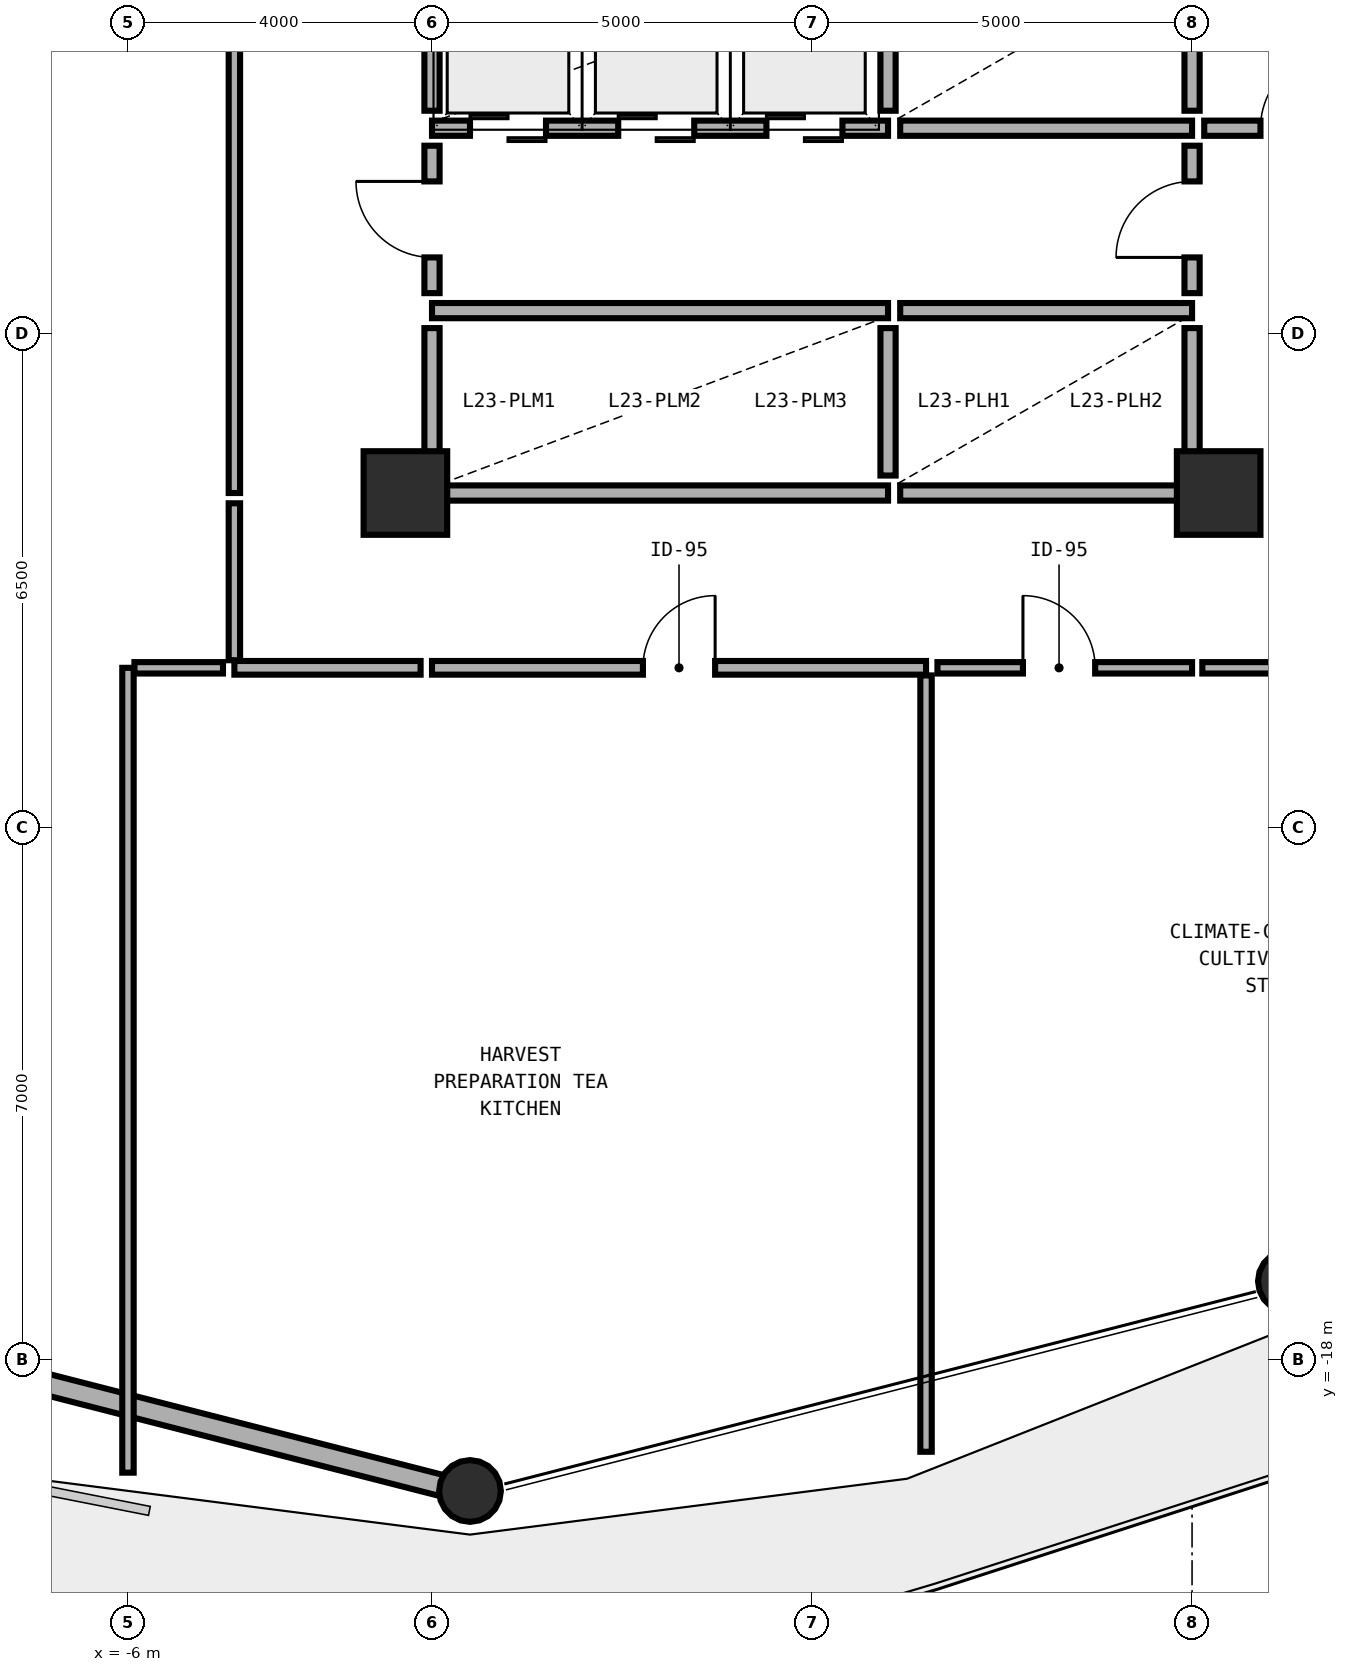
"""IFC4 building model, lengths in metres.
Left out: names, types, materials, properties, quantities, classifications, styles, units other than length and angle.
Written with IfcOpenShell. Run it as: python <this file> out.ifc"""

import sys

from ifc_helpers import new_model, si_unit, direction, frame, frame_2d, origin, origin_2d, place, context, subcontext, project, spatial, rectangle, hollow_circle, extrude, element, fill, save


model = new_model("IFC4")
c1 = context("Model", 3, precision=1e-05, world=origin(), true_north=direction((0.0, 1.0)))
c2 = subcontext(c1, "Body", "Model", "MODEL_VIEW")
j1 = project(units=[si_unit("LENGTHUNIT", "METRE"), si_unit("PLANEANGLEUNIT", "RADIAN")], contexts=[c1])
p1 = place(None, origin())
s1 = spatial("IfcSite", under=j1, at=p1, CompositionType="ELEMENT")
p2 = place(p1, origin())
s2 = spatial("IfcBuilding", under=s1, at=p2, CompositionType="ELEMENT")
p3 = place(p2, frame((0.0, 0.0, 95.4)))
s3 = spatial("IfcBuildingStorey", under=s2, at=p3, CompositionType="ELEMENT", Elevation=95.4)
for number, where, z_axis, x_axis in (
    (1, (-2.35, -6.6, 0.0), (0.0, 0.0, 1.0), (1.0, 0.0, 0.0)),
    (2, (8.35, -6.6, 0.0), (0.0, 0.0, 1.0), (1.0, 0.0, 0.0)),
):
    element("IfcColumn", number, at=place(p3, frame(where, z_axis=z_axis, x_axis=x_axis)), inside=s3, PredefinedType="COLUMN", context=c2, shape_type="SweptSolid", body=[
        extrude(rectangle(XDim=1.1, YDim=1.1, at=origin_2d()), origin(), (0.0, 0.0, 1.0), 3.875),
    ])
p4 = place(p3, frame((-1.5, -19.755, 0.0), z_axis=(0.0, 0.012347848881, 0.999923762408), x_axis=(-1.0, 0.0, 0.0)))
e3 = element("IfcColumn", 3, at=p4, inside=s3, PredefinedType="COLUMN", context=c2, shape_type="SweptSolid", body=[
    extrude(hollow_circle(Radius=0.406, WallThickness=0.03, at=origin_2d()), origin(), (0.0, 0.0, 1.0), 3.875),
])
p5 = place(p3, frame((9.291, -16.991, 0.0), z_axis=(-0.008630730053, 0.010772663059, 0.999904725576), x_axis=(-0.780423354579, -0.625251459517, 0.0)))
e4 = element("IfcColumn", 4, at=p5, inside=s3, PredefinedType="COLUMN", context=c2, shape_type="SweptSolid", body=[
    extrude(hollow_circle(Radius=0.406, WallThickness=0.03, at=origin_2d()), origin(), (0.0, 0.0, 1.0), 3.875),
])
p6 = place(p3, frame((-1.85, -19.665, 0.0), z_axis=(0.0, 0.0, 1.0), x_axis=(-0.96873684182, 0.24809057076, 0.0)))
e5 = element("IfcWall", 5, at=p6, inside=s3, PredefinedType="SOLIDWALL", context=c2, shape_type="SweptSolid", body=[
    extrude(rectangle(XDim=10.417, YDim=0.28, at=frame_2d((5.208, 0.0))), origin(), (0.0, 0.0, 1.0), 3.11),
])
p7 = place(p3, frame((-2.0, -1.8, 0.0), z_axis=(0.0, 0.0, 1.0), x_axis=(1.0, 0.0, 0.0)))
e6 = element("IfcWall", 6, at=p7, inside=s3, PredefinedType="SOLIDWALL", context=c2, shape_type="SweptSolid", body=[
    extrude(rectangle(XDim=6.0, YDim=0.2, at=frame_2d((3.0, 0.0))), origin(), (0.0, 0.0, 1.0), 3.64),
])
p8 = place(p7, frame((0.5, 0.0, 0.0)))
e7 = element("IfcOpeningElement", 7, at=p8, cuts=e6, PredefinedType="OPENING", context=c2, shape_type="SweptSolid", body=[
    extrude(rectangle(XDim=1.0, YDim=2.2, at=frame_2d((0.5, 1.1))), frame((0.0, 0.11, 0.0), z_axis=(0.0, -1.0, 0.0), x_axis=(1.0, 0.0, 0.0)), (0.0, 0.0, 1.0), 0.22),
])
p9 = place(p7, frame((2.45, 0.0, 0.0)))
e8 = element("IfcOpeningElement", 8, at=p9, cuts=e6, PredefinedType="OPENING", context=c2, shape_type="SweptSolid", body=[
    extrude(rectangle(XDim=1.0, YDim=2.2, at=frame_2d((0.5, 1.1))), frame((0.0, 0.11, 0.0), z_axis=(0.0, -1.0, 0.0), x_axis=(1.0, 0.0, 0.0)), (0.0, 0.0, 1.0), 0.22),
])
p10 = place(p7, frame((4.4, 0.0, 0.0)))
e9 = element("IfcOpeningElement", 9, at=p10, cuts=e6, PredefinedType="OPENING", context=c2, shape_type="SweptSolid", body=[
    extrude(rectangle(XDim=1.0, YDim=2.2, at=frame_2d((0.5, 1.1))), frame((0.0, 0.11, 0.0), z_axis=(0.0, -1.0, 0.0), x_axis=(1.0, 0.0, 0.0)), (0.0, 0.0, 1.0), 0.22),
])
p11 = place(p3, frame((-2.0, -1.57, 0.0), z_axis=(0.0, 0.0, 1.0), x_axis=(0.0, 1.0, 0.0)))
e10 = element("IfcWall", 10, at=p11, inside=s3, PredefinedType="SOLIDWALL", context=c2, shape_type="SweptSolid", body=[
    extrude(rectangle(XDim=2.05, YDim=0.2, at=frame_2d((1.025, 0.0))), origin(), (0.0, 0.0, 1.0), 3.022),
])
p12 = place(p3, frame((4.16, -1.8, 0.0), z_axis=(0.0, 0.0, 1.0), x_axis=(1.0, 0.0, 0.0)))
e11 = element("IfcWall", 11, at=p12, inside=s3, PredefinedType="SOLIDWALL", context=c2, shape_type="SweptSolid", body=[
    extrude(rectangle(XDim=3.84, YDim=0.2, at=frame_2d((1.92, 0.0))), origin(), (0.0, 0.0, 1.0), 3.64),
])
p13 = place(p3, frame((4.0, -1.57, 0.0), z_axis=(0.0, 0.0, 1.0), x_axis=(0.0, 1.0, 0.0)))
e12 = element("IfcWall", 12, at=p13, inside=s3, PredefinedType="SOLIDWALL", context=c2, shape_type="SweptSolid", body=[
    extrude(rectangle(XDim=1.94, YDim=0.2, at=frame_2d((0.97, 0.0))), origin(), (0.0, 0.0, 1.0), 3.64),
])
p14 = place(p3, frame((8.0, -1.57, 0.0), z_axis=(0.0, 0.0, 1.0), x_axis=(0.0, 1.0, 0.0)))
e13 = element("IfcWall", 13, at=p14, inside=s3, PredefinedType="SOLIDWALL", context=c2, shape_type="SweptSolid", body=[
    extrude(rectangle(XDim=2.05, YDim=0.2, at=frame_2d((1.025, 0.0))), origin(), (0.0, 0.0, 1.0), 3.072),
])
p15 = place(p3, frame((-2.0, -4.2, 0.0), z_axis=(0.0, 0.0, 1.0), x_axis=(1.0, 0.0, 0.0)))
e14 = element("IfcWall", 14, at=p15, inside=s3, PredefinedType="SOLIDWALL", context=c2, shape_type="SweptSolid", body=[
    extrude(rectangle(XDim=6.0, YDim=0.2, at=frame_2d((3.0, 0.0))), origin(), (0.0, 0.0, 1.0), 3.64),
])
p16 = place(p3, frame((-2.0, -6.6, 0.0), z_axis=(0.0, 0.0, 1.0), x_axis=(1.0, 0.0, 0.0)))
e15 = element("IfcWall", 15, at=p16, inside=s3, PredefinedType="SOLIDWALL", context=c2, shape_type="SweptSolid", body=[
    extrude(rectangle(XDim=6.0, YDim=0.2, at=frame_2d((3.0, 0.0))), origin(), (0.0, 0.0, 1.0), 3.172),
])
p17 = place(p3, frame((-2.0, -6.37, 0.0), z_axis=(0.0, 0.0, 1.0), x_axis=(0.0, 1.0, 0.0)))
e16 = element("IfcWall", 16, at=p17, inside=s3, PredefinedType="SOLIDWALL", context=c2, shape_type="SweptSolid", body=[
    extrude(rectangle(XDim=1.94, YDim=0.2, at=frame_2d((0.97, 0.0))), origin(), (0.0, 0.0, 1.0), 3.022),
])
p18 = place(p3, frame((4.16, -4.2, 0.0), z_axis=(0.0, 0.0, 1.0), x_axis=(1.0, 0.0, 0.0)))
e17 = element("IfcWall", 17, at=p18, inside=s3, PredefinedType="SOLIDWALL", context=c2, shape_type="SweptSolid", body=[
    extrude(rectangle(XDim=3.84, YDim=0.2, at=frame_2d((1.92, 0.0))), origin(), (0.0, 0.0, 1.0), 3.64),
])
p19 = place(p3, frame((4.16, -6.6, 0.0), z_axis=(0.0, 0.0, 1.0), x_axis=(1.0, 0.0, 0.0)))
e18 = element("IfcWall", 18, at=p19, inside=s3, PredefinedType="SOLIDWALL", context=c2, shape_type="SweptSolid", body=[
    extrude(rectangle(XDim=3.84, YDim=0.2, at=frame_2d((1.92, 0.0))), origin(), (0.0, 0.0, 1.0), 3.172),
])
p20 = place(p3, frame((4.0, -6.37, 0.0), z_axis=(0.0, 0.0, 1.0), x_axis=(0.0, 1.0, 0.0)))
e19 = element("IfcWall", 19, at=p20, inside=s3, PredefinedType="SOLIDWALL", context=c2, shape_type="SweptSolid", body=[
    extrude(rectangle(XDim=1.94, YDim=0.2, at=frame_2d((0.97, 0.0))), origin(), (0.0, 0.0, 1.0), 3.64),
])
p21 = place(p3, frame((8.0, -6.37, 0.0), z_axis=(0.0, 0.0, 1.0), x_axis=(0.0, 1.0, 0.0)))
e20 = element("IfcWall", 20, at=p21, inside=s3, PredefinedType="SOLIDWALL", context=c2, shape_type="SweptSolid", body=[
    extrude(rectangle(XDim=1.94, YDim=0.2, at=frame_2d((0.97, 0.0))), origin(), (0.0, 0.0, 1.0), 3.072),
])
p22 = place(p3, frame((-2.0, -3.97, 0.0), z_axis=(0.0, 0.0, 1.0), x_axis=(0.0, 1.0, 0.0)))
e21 = element("IfcWall", 21, at=p22, inside=s3, PredefinedType="MOVABLE", context=c2, shape_type="SweptSolid", body=[
    extrude(rectangle(XDim=1.94, YDim=0.2, at=frame_2d((0.97, 0.0))), origin(), (0.0, 0.0, 1.0), 3.022),
])
p23 = place(p22, frame((0.47, 0.0, 0.0)))
e22 = element("IfcOpeningElement", 22, at=p23, cuts=e21, PredefinedType="OPENING", context=c2, shape_type="SweptSolid", body=[
    extrude(rectangle(XDim=1.0, YDim=2.1, at=frame_2d((0.5, 1.05))), frame((0.0, 0.11, 0.0), z_axis=(0.0, -1.0, 0.0), x_axis=(1.0, 0.0, 0.0)), (0.0, 0.0, 1.0), 0.22),
])
p24 = place(p3, frame((8.0, -3.97, 0.0), z_axis=(0.0, 0.0, 1.0), x_axis=(0.0, 1.0, 0.0)))
e23 = element("IfcWall", 23, at=p24, inside=s3, PredefinedType="MOVABLE", context=c2, shape_type="SweptSolid", body=[
    extrude(rectangle(XDim=1.94, YDim=0.2, at=frame_2d((0.97, 0.0))), origin(), (0.0, 0.0, 1.0), 3.072),
])
p25 = place(p24, frame((0.47, 0.0, 0.0)))
e24 = element("IfcOpeningElement", 24, at=p25, cuts=e23, PredefinedType="OPENING", context=c2, shape_type="SweptSolid", body=[
    extrude(rectangle(XDim=1.0, YDim=2.1, at=frame_2d((0.5, 1.05))), frame((0.0, 0.11, 0.0), z_axis=(0.0, -1.0, 0.0), x_axis=(1.0, 0.0, 0.0)), (0.0, 0.0, 1.0), 0.22),
])
p26 = place(p3, frame((8.16, -1.8, 0.0), z_axis=(0.0, 0.0, 1.0), x_axis=(1.0, 0.0, 0.0)))
e25 = element("IfcWall", 25, at=p26, inside=s3, PredefinedType="MOVABLE", context=c2, shape_type="SweptSolid", body=[
    extrude(rectangle(XDim=2.64, YDim=0.2, at=frame_2d((1.32, 0.0))), origin(), (0.0, 0.0, 1.0), 3.64),
])
p27 = place(p26, frame((0.74, 0.0, 0.0)))
e26 = element("IfcOpeningElement", 26, at=p27, cuts=e25, PredefinedType="OPENING", context=c2, shape_type="SweptSolid", body=[
    extrude(rectangle(XDim=1.0, YDim=2.1, at=frame_2d((0.5, 1.05))), frame((0.0, 0.11, 0.0), z_axis=(0.0, -1.0, 0.0), x_axis=(1.0, 0.0, 0.0)), (0.0, 0.0, 1.0), 0.22),
])
p28 = place(p3, frame((-2.0, -8.9, 0.0), z_axis=(0.0, 0.0, 1.0), x_axis=(1.0, 0.0, 0.0)))
e27 = element("IfcWall", 27, at=p28, inside=s3, PredefinedType="PLUMBINGWALL", context=c2, shape_type="SweptSolid", body=[
    extrude(rectangle(XDim=6.5, YDim=0.18, at=frame_2d((3.25, 0.0))), origin(), (0.0, 0.0, 1.0), 3.64),
])
p29 = place(p28, frame((2.775, 0.0, 0.0)))
e28 = element("IfcOpeningElement", 28, at=p29, cuts=e27, PredefinedType="OPENING", context=c2, shape_type="SweptSolid", body=[
    extrude(rectangle(XDim=0.95, YDim=2.1, at=frame_2d((0.475, 1.05))), frame((0.0, 0.1, 0.0), z_axis=(0.0, -1.0, 0.0), x_axis=(1.0, 0.0, 0.0)), (0.0, 0.0, 1.0), 0.2),
])
p30 = place(p3, frame((4.65, -8.9, 0.0), z_axis=(0.0, 0.0, 1.0), x_axis=(1.0, 0.0, 0.0)))
e29 = element("IfcWall", 29, at=p30, inside=s3, PredefinedType="PARTITIONING", context=c2, shape_type="SweptSolid", body=[
    extrude(rectangle(XDim=3.35, YDim=0.15, at=frame_2d((1.675, 0.0))), origin(), (0.0, 0.0, 1.0), 3.64),
])
p31 = place(p30, frame((1.125, 0.0, 0.0)))
e30 = element("IfcOpeningElement", 30, at=p31, cuts=e29, PredefinedType="OPENING", context=c2, shape_type="SweptSolid", body=[
    extrude(rectangle(XDim=0.95, YDim=2.1, at=frame_2d((0.475, 1.05))), frame((0.0, 0.085, 0.0), z_axis=(0.0, -1.0, 0.0), x_axis=(1.0, 0.0, 0.0)), (0.0, 0.0, 1.0), 0.17),
])
p32 = place(p3, frame((-4.6, 6.5, 0.0), z_axis=(0.0, 0.0, 1.0), x_axis=(0.0, -1.0, 0.0)))
e31 = element("IfcWall", 31, at=p32, inside=s3, PredefinedType="PARTITIONING", context=c2, shape_type="SweptSolid", body=[
    extrude(rectangle(XDim=13.1, YDim=0.15, at=frame_2d((6.55, 0.0))), origin(), (0.0, 0.0, 1.0), 3.64),
])
p33 = place(p32, frame((6.075, 0.0, 0.0)))
e32 = element("IfcOpeningElement", 32, at=p33, cuts=e31, PredefinedType="OPENING", context=c2, shape_type="SweptSolid", body=[
    extrude(rectangle(XDim=0.95, YDim=2.1, at=frame_2d((0.475, 1.05))), frame((0.0, 0.085, 0.0), z_axis=(0.0, -1.0, 0.0), x_axis=(1.0, 0.0, 0.0)), (0.0, 0.0, 1.0), 0.17),
])
p34 = place(p3, frame((-4.6, -8.9, 0.0), z_axis=(0.0, 0.0, 1.0), x_axis=(1.0, 0.0, 0.0)))
e33 = element("IfcWall", 33, at=p34, inside=s3, PredefinedType="PLUMBINGWALL", context=c2, shape_type="SweptSolid", body=[
    extrude(rectangle(XDim=2.45, YDim=0.18, at=frame_2d((1.225, 0.0))), origin(), (0.0, 0.0, 1.0), 3.64),
])
p35 = place(p3, frame((4.5, -9.0, 0.0), z_axis=(0.0, 0.0, 1.0), x_axis=(0.0, -1.0, 0.0)))
e34 = element("IfcWall", 34, at=p35, inside=s3, PredefinedType="PARTITIONING", context=c2, shape_type="SweptSolid", body=[
    extrude(rectangle(XDim=10.215, YDim=0.15, at=frame_2d((5.107, 0.0))), origin(), (0.0, 0.0, 1.0), 3.64),
])
p36 = place(p3, frame((-6.0, -19.49, 0.0), z_axis=(0.0, 0.0, 1.0), x_axis=(0.0, 1.0, 0.0)))
e35 = element("IfcWall", 35, at=p36, inside=s3, PredefinedType="PARTITIONING", context=c2, shape_type="SweptSolid", body=[
    extrude(rectangle(XDim=10.59, YDim=0.15, at=frame_2d((5.295, 0.0))), origin(), (0.0, 0.0, 1.0), 3.64),
])
p37 = place(p3, frame((-5.915, -8.9, 0.0), z_axis=(0.0, 0.0, 1.0), x_axis=(1.0, 0.0, 0.0)))
e36 = element("IfcWall", 36, at=p37, inside=s3, PredefinedType="PARTITIONING", context=c2, shape_type="SweptSolid", body=[
    extrude(rectangle(XDim=1.165, YDim=0.15, at=frame_2d((0.583, 0.0))), origin(), (0.0, 0.0, 1.0), 3.64),
])
p38 = place(p3, frame((8.135, -8.9, 0.0), z_axis=(0.0, 0.0, 1.0), x_axis=(1.0, 0.0, 0.0)))
e37 = element("IfcWall", 37, at=p38, inside=s3, PredefinedType="PARTITIONING", context=c2, shape_type="SweptSolid", body=[
    extrude(rectangle(XDim=2.665, YDim=0.15, at=frame_2d((1.333, 0.0))), origin(), (0.0, 0.0, 1.0), 3.64),
])
p39 = place(p3, frame((-4.6, -6.735, 0.0), z_axis=(0.0, 0.0, 1.0), x_axis=(0.0, -1.0, 0.0)))
e38 = element("IfcWall", 38, at=p39, inside=s3, PredefinedType="PARTITIONING", context=c2, shape_type="SweptSolid", body=[
    extrude(rectangle(XDim=2.065, YDim=0.15, at=frame_2d((1.032, 0.0))), origin(), (0.0, 0.0, 1.0), 3.64),
])
p40 = place(p23, origin())
e39 = element("IfcDoor", 39, at=p40, inside=s3, OperationType="SINGLE_SWING_RIGHT", PredefinedType="DOOR", context=c2, shape_type="SweptSolid", body=[
    extrude(rectangle(XDim=1.0, YDim=2.1, at=frame_2d((0.5, 1.05))), frame((0.0, 0.025, 0.0), z_axis=(0.0, -1.0, 0.0), x_axis=(1.0, 0.0, 0.0)), (0.0, 0.0, 1.0), 0.05),
])
fill(e22, e39)
p41 = place(p25, origin())
e40 = element("IfcDoor", 40, at=p41, inside=s3, OperationType="SINGLE_SWING_LEFT", PredefinedType="DOOR", context=c2, shape_type="SweptSolid", body=[
    extrude(rectangle(XDim=1.0, YDim=2.1, at=frame_2d((0.5, 1.05))), frame((0.0, 0.025, 0.0), z_axis=(0.0, -1.0, 0.0), x_axis=(1.0, 0.0, 0.0)), (0.0, 0.0, 1.0), 0.05),
])
fill(e24, e40)
p42 = place(p27, origin())
e41 = element("IfcDoor", 41, at=p42, inside=s3, OperationType="SINGLE_SWING_RIGHT", PredefinedType="DOOR", context=c2, shape_type="SweptSolid", body=[
    extrude(rectangle(XDim=1.0, YDim=2.1, at=frame_2d((0.5, 1.05))), frame((0.0, 0.025, 0.0), z_axis=(0.0, -1.0, 0.0), x_axis=(1.0, 0.0, 0.0)), (0.0, 0.0, 1.0), 0.05),
])
fill(e26, e41)
p43 = place(p29, origin())
e42 = element("IfcDoor", 42, at=p43, inside=s3, OperationType="SINGLE_SWING_RIGHT", PredefinedType="DOOR", context=c2, shape_type="SweptSolid", body=[
    extrude(rectangle(XDim=0.95, YDim=2.1, at=frame_2d((0.475, 1.05))), frame((0.0, 0.025, 0.0), z_axis=(0.0, -1.0, 0.0), x_axis=(1.0, 0.0, 0.0)), (0.0, 0.0, 1.0), 0.05),
])
fill(e28, e42)
p44 = place(p31, origin())
e43 = element("IfcDoor", 43, at=p44, inside=s3, OperationType="SINGLE_SWING_LEFT", PredefinedType="DOOR", context=c2, shape_type="SweptSolid", body=[
    extrude(rectangle(XDim=0.95, YDim=2.1, at=frame_2d((0.475, 1.05))), frame((0.0, 0.025, 0.0), z_axis=(0.0, -1.0, 0.0), x_axis=(1.0, 0.0, 0.0)), (0.0, 0.0, 1.0), 0.05),
])
fill(e30, e43)
p45 = place(p8, origin())
e44 = element("IfcDoor", 44, at=p45, inside=s3, OperationType="DOUBLE_DOOR_SLIDING", PredefinedType="DOOR", context=c2, shape_type="SweptSolid", body=[
    extrude(rectangle(XDim=1.0, YDim=2.2, at=frame_2d((0.5, 1.1))), frame((0.0, 0.025, 0.0), z_axis=(0.0, -1.0, 0.0), x_axis=(1.0, 0.0, 0.0)), (0.0, 0.0, 1.0), 0.05),
])
fill(e7, e44)
p46 = place(p9, origin())
e45 = element("IfcDoor", 45, at=p46, inside=s3, OperationType="DOUBLE_DOOR_SLIDING", PredefinedType="DOOR", context=c2, shape_type="SweptSolid", body=[
    extrude(rectangle(XDim=1.0, YDim=2.2, at=frame_2d((0.5, 1.1))), frame((0.0, 0.025, 0.0), z_axis=(0.0, -1.0, 0.0), x_axis=(1.0, 0.0, 0.0)), (0.0, 0.0, 1.0), 0.05),
])
fill(e8, e45)
p47 = place(p10, origin())
e46 = element("IfcDoor", 46, at=p47, inside=s3, OperationType="DOUBLE_DOOR_SLIDING", PredefinedType="DOOR", context=c2, shape_type="SweptSolid", body=[
    extrude(rectangle(XDim=1.0, YDim=2.2, at=frame_2d((0.5, 1.1))), frame((0.0, 0.025, 0.0), z_axis=(0.0, -1.0, 0.0), x_axis=(1.0, 0.0, 0.0)), (0.0, 0.0, 1.0), 0.05),
])
fill(e9, e46)
save(model, sys.argv[1])
